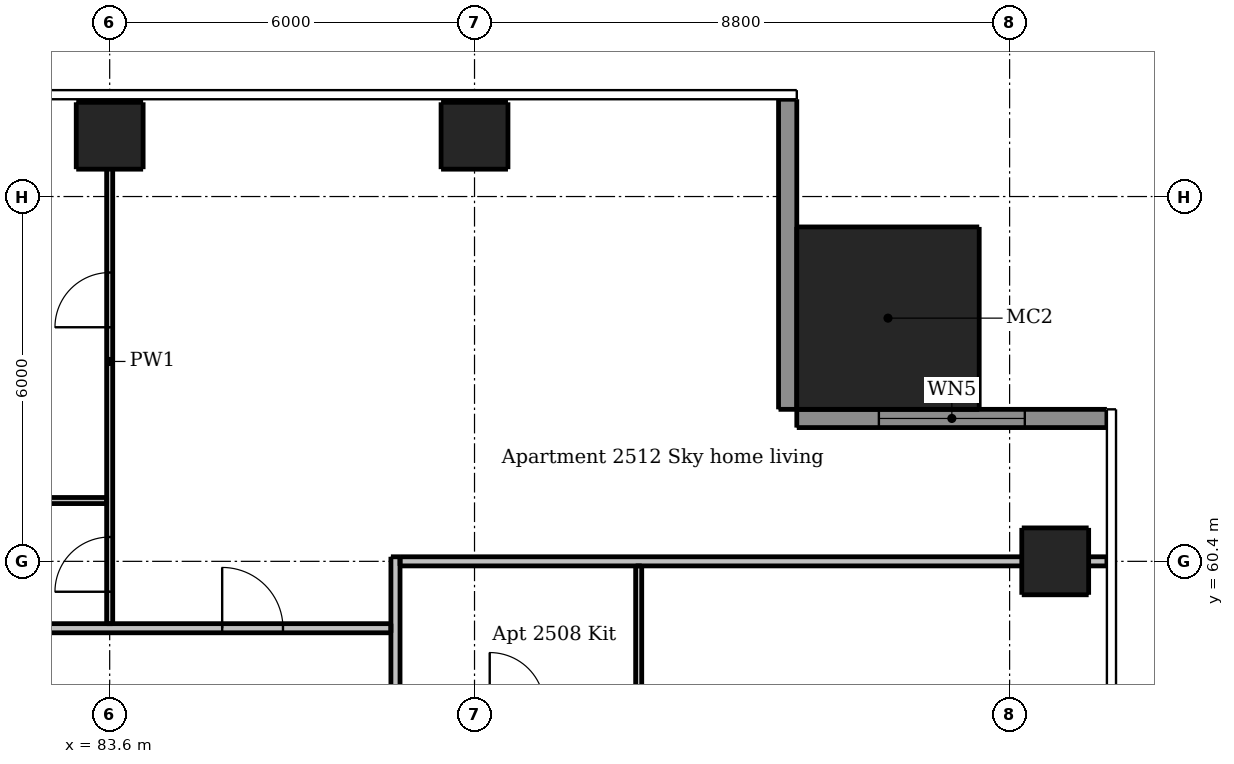
"""IFC4 building model, lengths in metres.
Left out: names, types, materials, properties, quantities, classifications, styles, units other than length and angle.
Written with IfcOpenShell. Run it as: python <this file> out.ifc"""

import sys

from ifc_helpers import new_model, si_unit, direction, frame, frame_2d, origin, origin_2d, place, context, subcontext, project, spatial, rectangle, extrude, element, fill, save


model = new_model("IFC4")
c1 = context("Model", 3, precision=1e-05, world=origin(), true_north=direction((0.0, 1.0)))
c2 = subcontext(c1, "Body", "Model", "MODEL_VIEW")
j1 = project(units=[si_unit("LENGTHUNIT", "METRE"), si_unit("PLANEANGLEUNIT", "RADIAN")], contexts=[c1])
p1 = place(None, origin())
s1 = spatial("IfcSite", under=j1, at=p1, CompositionType="ELEMENT")
p2 = place(p1, origin())
s2 = spatial("IfcBuilding", under=s1, at=p2, CompositionType="ELEMENT")
p3 = place(p2, frame((0.0, 0.0, 95.2)))
s3 = spatial("IfcBuildingStorey", under=s2, at=p3, CompositionType="ELEMENT", Elevation=95.2)
for number, where, z_axis, x_axis in (
    (1, (99.15, 60.4, 0.0), (0.0, 0.0, 1.0), (1.0, 0.0, 0.0)),
    (2, (83.6, 67.4, 0.0), (0.0, 0.0, 1.0), (1.0, 0.0, 0.0)),
    (3, (89.6, 67.4, 0.0), (0.0, 0.0, 1.0), (1.0, 0.0, 0.0)),
):
    element("IfcColumn", number, at=place(p3, frame(where, z_axis=z_axis, x_axis=x_axis)), inside=s3, PredefinedType="COLUMN", context=c2, shape_type="SweptSolid", body=[
        extrude(rectangle(XDim=1.1, YDim=1.1, at=origin_2d()), origin(), (0.0, 0.0, 1.0), 3.05),
    ])
p4 = place(p3, frame((96.4, 64.4, 0.0), z_axis=(0.0, 0.0, 1.0), x_axis=(1.0, 0.0, 0.0)))
e4 = element("IfcColumn", 4, at=p4, inside=s3, PredefinedType="COLUMN", context=c2, shape_type="SweptSolid", body=[
    extrude(rectangle(XDim=3.0, YDim=3.0, at=origin_2d()), origin(), (0.0, 0.0, 1.0), 3.3),
])
p5 = place(p3, frame((100.0, 62.75, 0.0), z_axis=(0.0, 0.0, 1.0), x_axis=(-1.0, 0.0, 0.0)))
e5 = element("IfcWall", 5, at=p5, inside=s3, PredefinedType="SOLIDWALL", context=c2, shape_type="SweptSolid", body=[
    extrude(rectangle(XDim=5.1, YDim=0.3, at=frame_2d((2.55, 0.0))), origin(), (0.0, 0.0, 1.0), 3.05),
])
p6 = place(p5, frame((1.35, 0.0, 0.15)))
e6 = element("IfcOpeningElement", 6, at=p6, cuts=e5, PredefinedType="OPENING", context=c2, shape_type="SweptSolid", body=[
    extrude(rectangle(XDim=2.4, YDim=2.1, at=frame_2d((1.2, 1.05))), frame((0.0, 0.16, 0.0), z_axis=(0.0, -1.0, 0.0), x_axis=(1.0, 0.0, 0.0)), (0.0, 0.0, 1.0), 0.32),
])
p7 = place(p3, frame((94.75, 62.9, 0.0), z_axis=(0.0, 0.0, 1.0), x_axis=(0.0, 1.0, 0.0)))
e7 = element("IfcWall", 7, at=p7, inside=s3, PredefinedType="SOLIDWALL", context=c2, shape_type="SweptSolid", body=[
    extrude(rectangle(XDim=5.1, YDim=0.3, at=frame_2d((2.55, 0.0))), origin(), (0.0, 0.0, 1.0), 3.05),
])
p8 = place(p3, frame((83.6, 59.375, 0.0), z_axis=(0.0, 0.0, 1.0), x_axis=(0.0, 1.0, 0.0)))
e8 = element("IfcWall", 8, at=p8, inside=s3, PredefinedType="PARTITIONING", context=c2, shape_type="SweptSolid", body=[
    extrude(rectangle(XDim=8.625, YDim=0.1, at=frame_2d((4.312, 0.0))), origin(), (0.0, 0.0, 1.0), 2.516),
])
p9 = place(p8, frame((0.525, 0.0, 0.0)))
e9 = element("IfcOpeningElement", 9, at=p9, cuts=e8, PredefinedType="OPENING", context=c2, shape_type="SweptSolid", body=[
    extrude(rectangle(XDim=0.9, YDim=2.1, at=frame_2d((0.45, 1.05))), frame((0.0, 0.06, 0.0), z_axis=(0.0, -1.0, 0.0), x_axis=(1.0, 0.0, 0.0)), (0.0, 0.0, 1.0), 0.12),
])
p10 = place(p8, frame((4.875, 0.0, 0.0)))
e10 = element("IfcOpeningElement", 10, at=p10, cuts=e8, PredefinedType="OPENING", context=c2, shape_type="SweptSolid", body=[
    extrude(rectangle(XDim=0.9, YDim=2.1, at=frame_2d((0.45, 1.05))), frame((0.0, 0.06, 0.0), z_axis=(0.0, -1.0, 0.0), x_axis=(1.0, 0.0, 0.0)), (0.0, 0.0, 1.0), 0.12),
])
p11 = place(p3, frame((92.3, 57.95, 0.0), z_axis=(0.0, 0.0, 1.0), x_axis=(0.0, 1.0, 0.0)))
e11 = element("IfcWall", 11, at=p11, inside=s3, PredefinedType="PARTITIONING", context=c2, shape_type="SweptSolid", body=[
    extrude(rectangle(XDim=2.375, YDim=0.1, at=frame_2d((1.188, 0.0))), origin(), (0.0, 0.0, 1.0), 3.05),
])
p12 = place(p3, frame((83.55, 61.4, 0.0), z_axis=(0.0, 0.0, 1.0), x_axis=(-1.0, 0.0, 0.0)))
e12 = element("IfcWall", 12, at=p12, inside=s3, PredefinedType="PARTITIONING", context=c2, shape_type="SweptSolid", body=[
    extrude(rectangle(XDim=8.0, YDim=0.1, at=frame_2d((4.0, 0.0))), origin(), (0.0, 0.0, 1.0), 3.05),
])
p13 = place(p12, frame((6.6, 0.0, 0.0)))
e13 = element("IfcOpeningElement", 13, at=p13, cuts=e12, PredefinedType="OPENING", context=c2, shape_type="SweptSolid", body=[
    extrude(rectangle(XDim=0.8, YDim=2.1, at=frame_2d((0.4, 1.05))), frame((0.0, 0.06, 0.0), z_axis=(0.0, -1.0, 0.0), x_axis=(1.0, 0.0, 0.0)), (0.0, 0.0, 1.0), 0.12),
])
p14 = place(p12, frame((3.75, 0.0, 0.0)))
e14 = element("IfcOpeningElement", 14, at=p14, cuts=e12, PredefinedType="OPENING", context=c2, shape_type="SweptSolid", body=[
    extrude(rectangle(XDim=0.8, YDim=2.1, at=frame_2d((0.4, 1.05))), frame((0.0, 0.06, 0.0), z_axis=(0.0, -1.0, 0.0), x_axis=(1.0, 0.0, 0.0)), (0.0, 0.0, 1.0), 0.12),
])
p15 = place(p3, frame((88.3, 60.475, 0.0), z_axis=(0.0, 0.0, 1.0), x_axis=(0.0, -1.0, 0.0)))
e15 = element("IfcWall", 15, at=p15, inside=s3, PredefinedType="PARTITIONING", context=c2, shape_type="SweptSolid", body=[
    extrude(rectangle(XDim=28.7, YDim=0.15, at=frame_2d((14.35, 0.0))), origin(), (0.0, 0.0, 1.0), 3.05),
])
p16 = place(p15, frame((27.425, 0.0, 0.0)))
e16 = element("IfcOpeningElement", 16, at=p16, cuts=e15, PredefinedType="OPENING", context=c2, shape_type="SweptSolid", body=[
    extrude(rectangle(XDim=1.0, YDim=2.1, at=frame_2d((0.5, 1.05))), frame((0.0, 0.085, 0.0), z_axis=(0.0, -1.0, 0.0), x_axis=(1.0, 0.0, 0.0)), (0.0, 0.0, 1.0), 0.17),
])
p17 = place(p15, frame((17.575, 0.0, 0.0)))
e17 = element("IfcOpeningElement", 17, at=p17, cuts=e15, PredefinedType="OPENING", context=c2, shape_type="SweptSolid", body=[
    extrude(rectangle(XDim=1.0, YDim=2.1, at=frame_2d((0.5, 1.05))), frame((0.0, 0.085, 0.0), z_axis=(0.0, -1.0, 0.0), x_axis=(1.0, 0.0, 0.0)), (0.0, 0.0, 1.0), 0.17),
])
p18 = place(p15, frame((11.575, 0.0, 0.0)))
e18 = element("IfcOpeningElement", 18, at=p18, cuts=e15, PredefinedType="OPENING", context=c2, shape_type="SweptSolid", body=[
    extrude(rectangle(XDim=1.0, YDim=2.1, at=frame_2d((0.5, 1.05))), frame((0.0, 0.085, 0.0), z_axis=(0.0, -1.0, 0.0), x_axis=(1.0, 0.0, 0.0)), (0.0, 0.0, 1.0), 0.17),
])
p19 = place(p15, frame((3.775, 0.0, 0.0)))
e19 = element("IfcOpeningElement", 19, at=p19, cuts=e15, PredefinedType="OPENING", context=c2, shape_type="SweptSolid", body=[
    extrude(rectangle(XDim=1.0, YDim=2.1, at=frame_2d((0.5, 1.05))), frame((0.0, 0.085, 0.0), z_axis=(0.0, -1.0, 0.0), x_axis=(1.0, 0.0, 0.0)), (0.0, 0.0, 1.0), 0.17),
])
p20 = place(p3, frame((88.375, 60.4, 0.0), z_axis=(0.0, 0.0, 1.0), x_axis=(1.0, 0.0, 0.0)))
e20 = element("IfcWall", 20, at=p20, inside=s3, PredefinedType="PARTITIONING", context=c2, shape_type="SweptSolid", body=[
    extrude(rectangle(XDim=11.625, YDim=0.15, at=frame_2d((5.812, 0.0))), origin(), (0.0, 0.0, 1.0), 2.516),
])
p21 = place(p3, frame((59.675, 59.3, 0.0), z_axis=(0.0, 0.0, 1.0), x_axis=(1.0, 0.0, 0.0)))
e21 = element("IfcWall", 21, at=p21, inside=s3, PredefinedType="PARTITIONING", context=c2, shape_type="SweptSolid", body=[
    extrude(rectangle(XDim=28.55, YDim=0.15, at=frame_2d((14.275, 0.0))), origin(), (0.0, 0.0, 1.0), 3.05),
])
p22 = place(p21, frame((2.425, 0.0, 0.0)))
e22 = element("IfcOpeningElement", 22, at=p22, cuts=e21, PredefinedType="OPENING", context=c2, shape_type="SweptSolid", body=[
    extrude(rectangle(XDim=1.0, YDim=2.1, at=frame_2d((0.5, 1.05))), frame((0.0, 0.085, 0.0), z_axis=(0.0, -1.0, 0.0), x_axis=(1.0, 0.0, 0.0)), (0.0, 0.0, 1.0), 0.17),
])
p23 = place(p21, frame((8.425, 0.0, 0.0)))
e23 = element("IfcOpeningElement", 23, at=p23, cuts=e21, PredefinedType="OPENING", context=c2, shape_type="SweptSolid", body=[
    extrude(rectangle(XDim=1.0, YDim=2.1, at=frame_2d((0.5, 1.05))), frame((0.0, 0.085, 0.0), z_axis=(0.0, -1.0, 0.0), x_axis=(1.0, 0.0, 0.0)), (0.0, 0.0, 1.0), 0.17),
])
p24 = place(p21, frame((14.425, 0.0, 0.0)))
e24 = element("IfcOpeningElement", 24, at=p24, cuts=e21, PredefinedType="OPENING", context=c2, shape_type="SweptSolid", body=[
    extrude(rectangle(XDim=1.0, YDim=2.1, at=frame_2d((0.5, 1.05))), frame((0.0, 0.085, 0.0), z_axis=(0.0, -1.0, 0.0), x_axis=(1.0, 0.0, 0.0)), (0.0, 0.0, 1.0), 0.17),
])
p25 = place(p21, frame((25.775, 0.0, 0.0)))
e25 = element("IfcOpeningElement", 25, at=p25, cuts=e21, PredefinedType="OPENING", context=c2, shape_type="SweptSolid", body=[
    extrude(rectangle(XDim=1.0, YDim=2.1, at=frame_2d((0.5, 1.05))), frame((0.0, 0.085, 0.0), z_axis=(0.0, -1.0, 0.0), x_axis=(1.0, 0.0, 0.0)), (0.0, 0.0, 1.0), 0.17),
])
p26 = place(p6, origin())
e26 = element("IfcWindow", 26, at=p26, inside=s3, PartitioningType="DOUBLE_PANEL_VERTICAL", PredefinedType="WINDOW", context=c2, shape_type="SweptSolid", body=[
    extrude(rectangle(XDim=2.4, YDim=2.1, at=frame_2d((1.2, 1.05))), frame((0.0, 0.03, 0.0), z_axis=(0.0, -1.0, 0.0), x_axis=(1.0, 0.0, 0.0)), (0.0, 0.0, 1.0), 0.06),
])
fill(e6, e26)
p27 = place(p25, origin())
e27 = element("IfcDoor", 27, at=p27, inside=s3, OperationType="SINGLE_SWING_LEFT", PredefinedType="DOOR", context=c2, shape_type="SweptSolid", body=[
    extrude(rectangle(XDim=1.0, YDim=2.1, at=frame_2d((0.5, 1.05))), frame((0.0, 0.025, 0.0), z_axis=(0.0, -1.0, 0.0), x_axis=(1.0, 0.0, 0.0)), (0.0, 0.0, 1.0), 0.05),
])
fill(e25, e27)
p28 = place(p9, origin())
e28 = element("IfcDoor", 28, at=p28, inside=s3, OperationType="SINGLE_SWING_LEFT", PredefinedType="DOOR", context=c2, shape_type="SweptSolid", body=[
    extrude(rectangle(XDim=0.9, YDim=2.1, at=frame_2d((0.45, 1.05))), frame((0.0, 0.025, 0.0), z_axis=(0.0, -1.0, 0.0), x_axis=(1.0, 0.0, 0.0)), (0.0, 0.0, 1.0), 0.05),
])
fill(e9, e28)
p29 = place(p10, origin())
e29 = element("IfcDoor", 29, at=p29, inside=s3, OperationType="SINGLE_SWING_LEFT", PredefinedType="DOOR", context=c2, shape_type="SweptSolid", body=[
    extrude(rectangle(XDim=0.9, YDim=2.1, at=frame_2d((0.45, 1.05))), frame((0.0, 0.025, 0.0), z_axis=(0.0, -1.0, 0.0), x_axis=(1.0, 0.0, 0.0)), (0.0, 0.0, 1.0), 0.05),
])
fill(e10, e29)
save(model, sys.argv[1])
